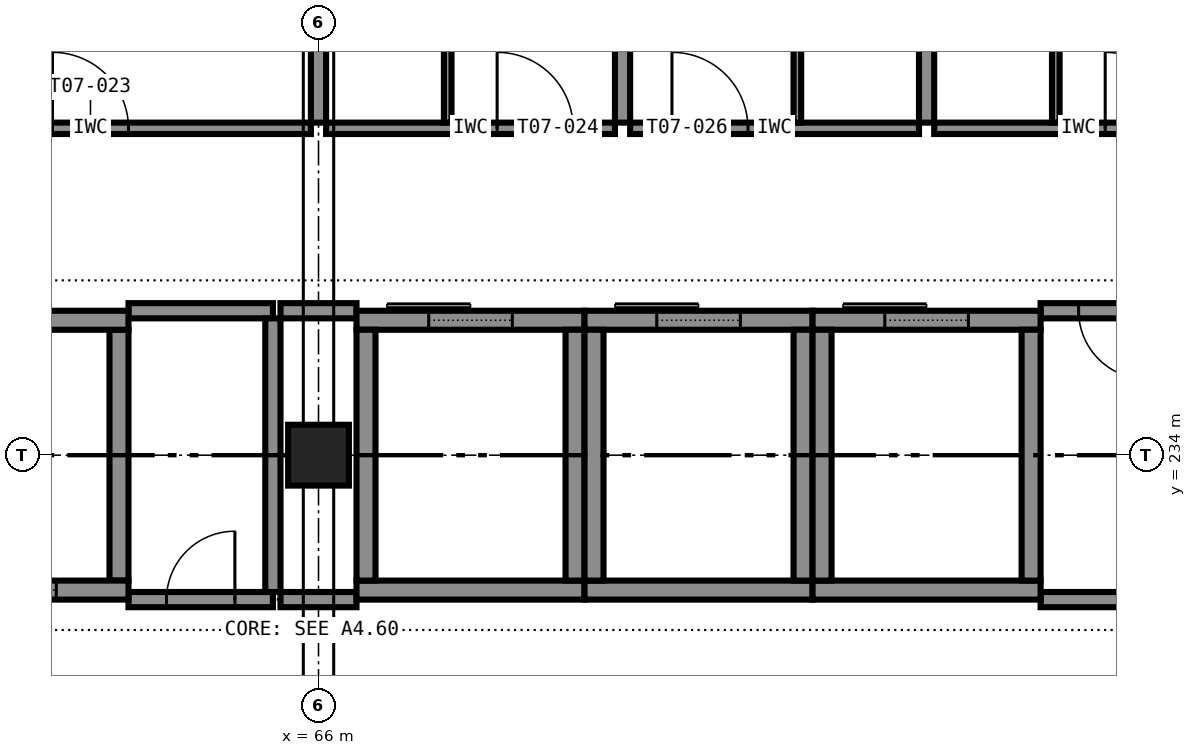
"""IFC4 building model, lengths in metres.
Left out: names, types, materials, properties, quantities, classifications, styles, units other than length and angle.
Written with IfcOpenShell. Run it as: python <this file> out.ifc"""

import sys

from ifc_helpers import new_model, si_unit, direction, frame, frame_2d, origin, origin_2d, place, context, subcontext, project, spatial, rectangle, extrude, element, fill, save


model = new_model("IFC4")
c1 = context("Model", 3, precision=1e-05, world=origin(), true_north=direction((0.0, 1.0)))
c2 = subcontext(c1, "Body", "Model", "MODEL_VIEW")
j1 = project(units=[si_unit("LENGTHUNIT", "METRE"), si_unit("PLANEANGLEUNIT", "RADIAN")], contexts=[c1])
p1 = place(None, origin())
s1 = spatial("IfcSite", under=j1, at=p1, CompositionType="ELEMENT")
p2 = place(p1, origin())
s2 = spatial("IfcBuilding", under=s1, at=p2, CompositionType="ELEMENT")
p3 = place(p2, frame((0.0, 0.0, 39.0)))
s3 = spatial("IfcBuildingStorey", under=s2, at=p3, CompositionType="ELEMENT", Elevation=39.0)
p4 = place(p3, frame((66.0, 234.0, 0.0), z_axis=(0.0, 0.0, 1.0), x_axis=(1.0, 0.0, 0.0)))
e1 = element("IfcColumn", 1, at=p4, inside=s3, PredefinedType="COLUMN", context=c2, shape_type="SweptSolid", body=[
    extrude(rectangle(XDim=0.8, YDim=0.8, at=origin_2d()), origin(), (0.0, 0.0, 1.0), 3.6),
])
p5 = place(p3, frame((60.5, 232.225, 0.0), z_axis=(0.0, 0.0, 1.0), x_axis=(1.0, 0.0, 0.0)))
e2 = element("IfcWall", 2, at=p5, inside=s3, PredefinedType="SHEAR", context=c2, shape_type="SweptSolid", body=[
    extrude(rectangle(XDim=3.0, YDim=0.25, at=frame_2d((1.5, 0.0))), origin(), (0.0, 0.0, 1.0), 3.6),
])
p6 = place(p5, frame((0.95, 0.0, 0.0)))
e3 = element("IfcOpeningElement", 3, at=p6, cuts=e2, PredefinedType="OPENING", context=c2, shape_type="SweptSolid", body=[
    extrude(rectangle(XDim=1.1, YDim=2.1, at=frame_2d((0.55, 1.05))), frame((0.0, 0.135, 0.0), z_axis=(0.0, -1.0, 0.0), x_axis=(1.0, 0.0, 0.0)), (0.0, 0.0, 1.0), 0.27),
])
p7 = place(p3, frame((60.5, 235.775, 0.0), z_axis=(0.0, 0.0, 1.0), x_axis=(1.0, 0.0, 0.0)))
e4 = element("IfcWall", 4, at=p7, inside=s3, PredefinedType="SHEAR", context=c2, shape_type="SweptSolid", body=[
    extrude(rectangle(XDim=3.0, YDim=0.25, at=frame_2d((1.5, 0.0))), origin(), (0.0, 0.0, 1.0), 3.6),
])
p8 = place(p3, frame((63.375, 232.35, 0.0), z_axis=(0.0, 0.0, 1.0), x_axis=(0.0, 1.0, 0.0)))
e5 = element("IfcWall", 5, at=p8, inside=s3, PredefinedType="SHEAR", context=c2, shape_type="SweptSolid", body=[
    extrude(rectangle(XDim=3.3, YDim=0.25, at=frame_2d((1.65, 0.0))), origin(), (0.0, 0.0, 1.0), 3.6),
])
p9 = place(p3, frame((66.5, 232.225, 0.0), z_axis=(0.0, 0.0, 1.0), x_axis=(1.0, 0.0, 0.0)))
e6 = element("IfcWall", 6, at=p9, inside=s3, PredefinedType="SHEAR", context=c2, shape_type="SweptSolid", body=[
    extrude(rectangle(XDim=3.0, YDim=0.25, at=frame_2d((1.5, 0.0))), origin(), (0.0, 0.0, 1.0), 3.6),
])
p10 = place(p3, frame((66.5, 235.775, 0.0), z_axis=(0.0, 0.0, 1.0), x_axis=(1.0, 0.0, 0.0)))
e7 = element("IfcWall", 7, at=p10, inside=s3, PredefinedType="SHEAR", context=c2, shape_type="SweptSolid", body=[
    extrude(rectangle(XDim=3.0, YDim=0.25, at=frame_2d((1.5, 0.0))), origin(), (0.0, 0.0, 1.0), 3.6),
])
p11 = place(p10, frame((0.95, 0.0, 0.0)))
e8 = element("IfcOpeningElement", 8, at=p11, cuts=e7, PredefinedType="OPENING", context=c2, shape_type="SweptSolid", body=[
    extrude(rectangle(XDim=1.1, YDim=2.1, at=frame_2d((0.55, 1.05))), frame((0.0, 0.135, 0.0), z_axis=(0.0, -1.0, 0.0), x_axis=(1.0, 0.0, 0.0)), (0.0, 0.0, 1.0), 0.27),
])
for number, where, z_axis, x_axis in (
    (9, (66.625, 232.35, 0.0), (0.0, 0.0, 1.0), (0.0, 1.0, 0.0)),
    (10, (69.375, 232.35, 0.0), (0.0, 0.0, 1.0), (0.0, 1.0, 0.0)),
):
    element("IfcWall", number, at=place(p3, frame(where, z_axis=z_axis, x_axis=x_axis)), inside=s3, PredefinedType="SHEAR", context=c2, shape_type="SweptSolid", body=[
        extrude(rectangle(XDim=3.3, YDim=0.25, at=frame_2d((1.65, 0.0))), origin(), (0.0, 0.0, 1.0), 3.6),
    ])
p12 = place(p3, frame((69.5, 232.225, 0.0), z_axis=(0.0, 0.0, 1.0), x_axis=(1.0, 0.0, 0.0)))
e11 = element("IfcWall", 11, at=p12, inside=s3, PredefinedType="SHEAR", context=c2, shape_type="SweptSolid", body=[
    extrude(rectangle(XDim=3.0, YDim=0.25, at=frame_2d((1.5, 0.0))), origin(), (0.0, 0.0, 1.0), 3.6),
])
p13 = place(p3, frame((69.5, 235.775, 0.0), z_axis=(0.0, 0.0, 1.0), x_axis=(1.0, 0.0, 0.0)))
e12 = element("IfcWall", 12, at=p13, inside=s3, PredefinedType="SHEAR", context=c2, shape_type="SweptSolid", body=[
    extrude(rectangle(XDim=3.0, YDim=0.25, at=frame_2d((1.5, 0.0))), origin(), (0.0, 0.0, 1.0), 3.6),
])
p14 = place(p13, frame((0.95, 0.0, 0.0)))
e13 = element("IfcOpeningElement", 13, at=p14, cuts=e12, PredefinedType="OPENING", context=c2, shape_type="SweptSolid", body=[
    extrude(rectangle(XDim=1.1, YDim=2.1, at=frame_2d((0.55, 1.05))), frame((0.0, 0.135, 0.0), z_axis=(0.0, -1.0, 0.0), x_axis=(1.0, 0.0, 0.0)), (0.0, 0.0, 1.0), 0.27),
])
for number, where, z_axis, x_axis in (
    (14, (69.625, 232.35, 0.0), (0.0, 0.0, 1.0), (0.0, 1.0, 0.0)),
    (15, (72.375, 232.35, 0.0), (0.0, 0.0, 1.0), (0.0, 1.0, 0.0)),
):
    element("IfcWall", number, at=place(p3, frame(where, z_axis=z_axis, x_axis=x_axis)), inside=s3, PredefinedType="SHEAR", context=c2, shape_type="SweptSolid", body=[
        extrude(rectangle(XDim=3.3, YDim=0.25, at=frame_2d((1.65, 0.0))), origin(), (0.0, 0.0, 1.0), 3.6),
    ])
p15 = place(p3, frame((72.5, 232.225, 0.0), z_axis=(0.0, 0.0, 1.0), x_axis=(1.0, 0.0, 0.0)))
e16 = element("IfcWall", 16, at=p15, inside=s3, PredefinedType="SHEAR", context=c2, shape_type="SweptSolid", body=[
    extrude(rectangle(XDim=3.0, YDim=0.25, at=frame_2d((1.5, 0.0))), origin(), (0.0, 0.0, 1.0), 3.6),
])
p16 = place(p3, frame((72.5, 235.775, 0.0), z_axis=(0.0, 0.0, 1.0), x_axis=(1.0, 0.0, 0.0)))
e17 = element("IfcWall", 17, at=p16, inside=s3, PredefinedType="SHEAR", context=c2, shape_type="SweptSolid", body=[
    extrude(rectangle(XDim=3.0, YDim=0.25, at=frame_2d((1.5, 0.0))), origin(), (0.0, 0.0, 1.0), 3.6),
])
p17 = place(p16, frame((0.95, 0.0, 0.0)))
e18 = element("IfcOpeningElement", 18, at=p17, cuts=e17, PredefinedType="OPENING", context=c2, shape_type="SweptSolid", body=[
    extrude(rectangle(XDim=1.1, YDim=2.1, at=frame_2d((0.55, 1.05))), frame((0.0, 0.135, 0.0), z_axis=(0.0, -1.0, 0.0), x_axis=(1.0, 0.0, 0.0)), (0.0, 0.0, 1.0), 0.27),
])
for number, where, z_axis, x_axis in (
    (19, (72.625, 232.35, 0.0), (0.0, 0.0, 1.0), (0.0, 1.0, 0.0)),
    (20, (75.375, 232.35, 0.0), (0.0, 0.0, 1.0), (0.0, 1.0, 0.0)),
):
    element("IfcWall", number, at=place(p3, frame(where, z_axis=z_axis, x_axis=x_axis)), inside=s3, PredefinedType="SHEAR", context=c2, shape_type="SweptSolid", body=[
        extrude(rectangle(XDim=3.3, YDim=0.25, at=frame_2d((1.65, 0.0))), origin(), (0.0, 0.0, 1.0), 3.6),
    ])
p18 = place(p3, frame((63.5, 232.1, 0.0), z_axis=(0.0, 0.0, 1.0), x_axis=(1.0, 0.0, 0.0)))
e21 = element("IfcWall", 21, at=p18, inside=s3, PredefinedType="PARTITIONING", context=c2, shape_type="SweptSolid", body=[
    extrude(rectangle(XDim=1.9, YDim=0.2, at=frame_2d((0.95, 0.0))), origin(), (0.0, 0.0, 1.0), 3.4),
])
p19 = place(p18, frame((0.5, 0.0, 0.0)))
e22 = element("IfcOpeningElement", 22, at=p19, cuts=e21, PredefinedType="OPENING", context=c2, shape_type="SweptSolid", body=[
    extrude(rectangle(XDim=0.9, YDim=2.1, at=frame_2d((0.45, 1.05))), frame((0.0, 0.11, 0.0), z_axis=(0.0, -1.0, 0.0), x_axis=(1.0, 0.0, 0.0)), (0.0, 0.0, 1.0), 0.22),
])
p20 = place(p3, frame((65.5, 232.1, 0.0), z_axis=(0.0, 0.0, 1.0), x_axis=(1.0, 0.0, 0.0)))
e23 = element("IfcWall", 23, at=p20, inside=s3, PredefinedType="PARTITIONING", context=c2, shape_type="SweptSolid", body=[
    extrude(rectangle(XDim=1.0, YDim=0.2, at=frame_2d((0.5, 0.0))), origin(), (0.0, 0.0, 1.0), 3.4),
])
for number, where, z_axis, x_axis in (
    (24, (75.5, 232.1, 0.0), (0.0, 0.0, 1.0), (1.0, 0.0, 0.0)),
    (25, (63.5, 235.9, 0.0), (0.0, 0.0, 1.0), (1.0, 0.0, 0.0)),
):
    element("IfcWall", number, at=place(p3, frame(where, z_axis=z_axis, x_axis=x_axis)), inside=s3, PredefinedType="PARTITIONING", context=c2, shape_type="SweptSolid", body=[
        extrude(rectangle(XDim=1.9, YDim=0.2, at=frame_2d((0.95, 0.0))), origin(), (0.0, 0.0, 1.0), 3.4),
    ])
p21 = place(p3, frame((65.5, 235.9, 0.0), z_axis=(0.0, 0.0, 1.0), x_axis=(1.0, 0.0, 0.0)))
e26 = element("IfcWall", 26, at=p21, inside=s3, PredefinedType="PARTITIONING", context=c2, shape_type="SweptSolid", body=[
    extrude(rectangle(XDim=1.0, YDim=0.2, at=frame_2d((0.5, 0.0))), origin(), (0.0, 0.0, 1.0), 3.4),
])
p22 = place(p3, frame((77.4, 235.9, 0.0), z_axis=(0.0, 0.0, 1.0), x_axis=(-1.0, 0.0, 0.0)))
e27 = element("IfcWall", 27, at=p22, inside=s3, PredefinedType="PARTITIONING", context=c2, shape_type="SweptSolid", body=[
    extrude(rectangle(XDim=1.9, YDim=0.2, at=frame_2d((0.95, 0.0))), origin(), (0.0, 0.0, 1.0), 3.4),
])
p23 = place(p22, frame((0.5, 0.0, 0.0)))
e28 = element("IfcOpeningElement", 28, at=p23, cuts=e27, PredefinedType="OPENING", context=c2, shape_type="SweptSolid", body=[
    extrude(rectangle(XDim=0.9, YDim=2.1, at=frame_2d((0.45, 1.05))), frame((0.0, 0.11, 0.0), z_axis=(0.0, -1.0, 0.0), x_axis=(1.0, 0.0, 0.0)), (0.0, 0.0, 1.0), 0.22),
])
p24 = place(p3, frame((65.4, 232.2, 0.0), z_axis=(0.0, 0.0, 1.0), x_axis=(0.0, 1.0, 0.0)))
e29 = element("IfcWall", 29, at=p24, inside=s3, PredefinedType="PARTITIONING", context=c2, shape_type="SweptSolid", body=[
    extrude(rectangle(XDim=3.6, YDim=0.2, at=frame_2d((1.8, 0.0))), origin(), (0.0, 0.0, 1.0), 3.4),
])
p25 = place(p3, frame((60.1, 238.3, 0.0), z_axis=(0.0, 0.0, 1.0), x_axis=(1.0, 0.0, 0.0)))
e30 = element("IfcWall", 30, at=p25, inside=s3, PredefinedType="PARTITIONING", context=c2, shape_type="SweptSolid", body=[
    extrude(rectangle(XDim=5.8, YDim=0.15, at=frame_2d((2.9, 0.0))), origin(), (0.0, 0.0, 1.0), 3.4),
])
p26 = place(p25, frame((2.4, 0.0, 0.0)))
e31 = element("IfcOpeningElement", 31, at=p26, cuts=e30, PredefinedType="OPENING", context=c2, shape_type="SweptSolid", body=[
    extrude(rectangle(XDim=1.0, YDim=2.1, at=frame_2d((0.5, 1.05))), frame((0.0, 0.085, 0.0), z_axis=(0.0, -1.0, 0.0), x_axis=(1.0, 0.0, 0.0)), (0.0, 0.0, 1.0), 0.17),
])
p27 = place(p3, frame((66.1, 238.3, 0.0), z_axis=(0.0, 0.0, 1.0), x_axis=(1.0, 0.0, 0.0)))
e32 = element("IfcWall", 32, at=p27, inside=s3, PredefinedType="PARTITIONING", context=c2, shape_type="SweptSolid", body=[
    extrude(rectangle(XDim=3.8, YDim=0.15, at=frame_2d((1.9, 0.0))), origin(), (0.0, 0.0, 1.0), 3.4),
])
p28 = place(p27, frame((2.25, 0.0, 0.0)))
e33 = element("IfcOpeningElement", 33, at=p28, cuts=e32, PredefinedType="OPENING", context=c2, shape_type="SweptSolid", body=[
    extrude(rectangle(XDim=1.0, YDim=2.1, at=frame_2d((0.5, 1.05))), frame((0.0, 0.085, 0.0), z_axis=(0.0, -1.0, 0.0), x_axis=(1.0, 0.0, 0.0)), (0.0, 0.0, 1.0), 0.17),
])
p29 = place(p3, frame((67.7, 241.25, 0.0), z_axis=(0.0, 0.0, 1.0), x_axis=(0.0, -1.0, 0.0)))
e34 = element("IfcWall", 34, at=p29, inside=s3, PredefinedType="PARTITIONING", context=c2, shape_type="SweptSolid", body=[
    extrude(rectangle(XDim=2.875, YDim=0.1, at=frame_2d((1.438, 0.0))), origin(), (0.0, 0.0, 1.0), 3.4),
])
p30 = place(p29, frame((1.038, 0.0, 0.0)))
e35 = element("IfcOpeningElement", 35, at=p30, cuts=e34, PredefinedType="OPENING", context=c2, shape_type="SweptSolid", body=[
    extrude(rectangle(XDim=0.8, YDim=2.1, at=frame_2d((0.4, 1.05))), frame((0.0, 0.06, 0.0), z_axis=(0.0, -1.0, 0.0), x_axis=(1.0, 0.0, 0.0)), (0.0, 0.0, 1.0), 0.12),
])
p31 = place(p3, frame((70.1, 238.3, 0.0), z_axis=(0.0, 0.0, 1.0), x_axis=(1.0, 0.0, 0.0)))
e36 = element("IfcWall", 36, at=p31, inside=s3, PredefinedType="PARTITIONING", context=c2, shape_type="SweptSolid", body=[
    extrude(rectangle(XDim=3.8, YDim=0.15, at=frame_2d((1.9, 0.0))), origin(), (0.0, 0.0, 1.0), 3.4),
])
p32 = place(p31, frame((0.55, 0.0, 0.0)))
e37 = element("IfcOpeningElement", 37, at=p32, cuts=e36, PredefinedType="OPENING", context=c2, shape_type="SweptSolid", body=[
    extrude(rectangle(XDim=1.0, YDim=2.1, at=frame_2d((0.5, 1.05))), frame((0.0, 0.085, 0.0), z_axis=(0.0, -1.0, 0.0), x_axis=(1.0, 0.0, 0.0)), (0.0, 0.0, 1.0), 0.17),
])
p33 = place(p3, frame((72.3, 238.375, 0.0), z_axis=(0.0, 0.0, 1.0), x_axis=(0.0, 1.0, 0.0)))
e38 = element("IfcWall", 38, at=p33, inside=s3, PredefinedType="PARTITIONING", context=c2, shape_type="SweptSolid", body=[
    extrude(rectangle(XDim=2.875, YDim=0.1, at=frame_2d((1.438, 0.0))), origin(), (0.0, 0.0, 1.0), 3.4),
])
p34 = place(p33, frame((1.038, 0.0, 0.0)))
e39 = element("IfcOpeningElement", 39, at=p34, cuts=e38, PredefinedType="OPENING", context=c2, shape_type="SweptSolid", body=[
    extrude(rectangle(XDim=0.8, YDim=2.1, at=frame_2d((0.4, 1.05))), frame((0.0, 0.06, 0.0), z_axis=(0.0, -1.0, 0.0), x_axis=(1.0, 0.0, 0.0)), (0.0, 0.0, 1.0), 0.12),
])
p35 = place(p3, frame((74.1, 238.3, 0.0), z_axis=(0.0, 0.0, 1.0), x_axis=(1.0, 0.0, 0.0)))
e40 = element("IfcWall", 40, at=p35, inside=s3, PredefinedType="PARTITIONING", context=c2, shape_type="SweptSolid", body=[
    extrude(rectangle(XDim=3.8, YDim=0.15, at=frame_2d((1.9, 0.0))), origin(), (0.0, 0.0, 1.0), 3.4),
])
p36 = place(p35, frame((2.25, 0.0, 0.0)))
e41 = element("IfcOpeningElement", 41, at=p36, cuts=e40, PredefinedType="OPENING", context=c2, shape_type="SweptSolid", body=[
    extrude(rectangle(XDim=1.0, YDim=2.1, at=frame_2d((0.5, 1.05))), frame((0.0, 0.085, 0.0), z_axis=(0.0, -1.0, 0.0), x_axis=(1.0, 0.0, 0.0)), (0.0, 0.0, 1.0), 0.17),
])
p37 = place(p3, frame((75.7, 241.25, 0.0), z_axis=(0.0, 0.0, 1.0), x_axis=(0.0, -1.0, 0.0)))
e42 = element("IfcWall", 42, at=p37, inside=s3, PredefinedType="PARTITIONING", context=c2, shape_type="SweptSolid", body=[
    extrude(rectangle(XDim=2.875, YDim=0.1, at=frame_2d((1.438, 0.0))), origin(), (0.0, 0.0, 1.0), 3.4),
])
p38 = place(p37, frame((1.038, 0.0, 0.0)))
e43 = element("IfcOpeningElement", 43, at=p38, cuts=e42, PredefinedType="OPENING", context=c2, shape_type="SweptSolid", body=[
    extrude(rectangle(XDim=0.8, YDim=2.1, at=frame_2d((0.4, 1.05))), frame((0.0, 0.06, 0.0), z_axis=(0.0, -1.0, 0.0), x_axis=(1.0, 0.0, 0.0)), (0.0, 0.0, 1.0), 0.12),
])
p39 = place(p3, frame((66.0, 245.6, 0.0), z_axis=(0.0, 0.0, 1.0), x_axis=(0.0, -1.0, 0.0)))
e44 = element("IfcWall", 44, at=p39, inside=s3, PredefinedType="PARTITIONING", context=c2, shape_type="SweptSolid", body=[
    extrude(rectangle(XDim=7.225, YDim=0.2, at=frame_2d((3.613, 0.0))), origin(), (0.0, 0.0, 1.0), 2.6),
])
for number, where, z_axis, x_axis in (
    (45, (70.0, 245.7, 0.0), (0.0, 0.0, 1.0), (0.0, -1.0, 0.0)),
    (46, (74.0, 245.7, 0.0), (0.0, 0.0, 1.0), (0.0, -1.0, 0.0)),
):
    element("IfcWall", number, at=place(p3, frame(where, z_axis=z_axis, x_axis=x_axis)), inside=s3, PredefinedType="PARTITIONING", context=c2, shape_type="SweptSolid", body=[
        extrude(rectangle(XDim=7.325, YDim=0.2, at=frame_2d((3.663, 0.0))), origin(), (0.0, 0.0, 1.0), 3.4),
    ])
p40 = place(p19, origin())
e47 = element("IfcDoor", 47, at=p40, inside=s3, OperationType="SINGLE_SWING_RIGHT", PredefinedType="DOOR", context=c2, shape_type="SweptSolid", body=[
    extrude(rectangle(XDim=0.9, YDim=2.1, at=frame_2d((0.45, 1.05))), frame((0.0, 0.025, 0.0), z_axis=(0.0, -1.0, 0.0), x_axis=(1.0, 0.0, 0.0)), (0.0, 0.0, 1.0), 0.05),
])
fill(e22, e47)
p41 = place(p23, origin())
e48 = element("IfcDoor", 48, at=p41, inside=s3, OperationType="SINGLE_SWING_LEFT", PredefinedType="DOOR", context=c2, shape_type="SweptSolid", body=[
    extrude(rectangle(XDim=0.9, YDim=2.1, at=frame_2d((0.45, 1.05))), frame((0.0, 0.025, 0.0), z_axis=(0.0, -1.0, 0.0), x_axis=(1.0, 0.0, 0.0)), (0.0, 0.0, 1.0), 0.05),
])
fill(e28, e48)
p42 = place(p26, origin())
e49 = element("IfcDoor", 49, at=p42, inside=s3, OperationType="SINGLE_SWING_LEFT", PredefinedType="DOOR", context=c2, shape_type="SweptSolid", body=[
    extrude(rectangle(XDim=1.0, YDim=2.1, at=frame_2d((0.5, 1.05))), frame((0.0, 0.025, 0.0), z_axis=(0.0, -1.0, 0.0), x_axis=(1.0, 0.0, 0.0)), (0.0, 0.0, 1.0), 0.05),
])
fill(e31, e49)
p43 = place(p28, origin())
e50 = element("IfcDoor", 50, at=p43, inside=s3, OperationType="SINGLE_SWING_LEFT", PredefinedType="DOOR", context=c2, shape_type="SweptSolid", body=[
    extrude(rectangle(XDim=1.0, YDim=2.1, at=frame_2d((0.5, 1.05))), frame((0.0, 0.025, 0.0), z_axis=(0.0, -1.0, 0.0), x_axis=(1.0, 0.0, 0.0)), (0.0, 0.0, 1.0), 0.05),
])
fill(e33, e50)
p44 = place(p32, origin())
e51 = element("IfcDoor", 51, at=p44, inside=s3, OperationType="SINGLE_SWING_LEFT", PredefinedType="DOOR", context=c2, shape_type="SweptSolid", body=[
    extrude(rectangle(XDim=1.0, YDim=2.1, at=frame_2d((0.5, 1.05))), frame((0.0, 0.025, 0.0), z_axis=(0.0, -1.0, 0.0), x_axis=(1.0, 0.0, 0.0)), (0.0, 0.0, 1.0), 0.05),
])
fill(e37, e51)
p45 = place(p36, origin())
e52 = element("IfcDoor", 52, at=p45, inside=s3, OperationType="SINGLE_SWING_LEFT", PredefinedType="DOOR", context=c2, shape_type="SweptSolid", body=[
    extrude(rectangle(XDim=1.0, YDim=2.1, at=frame_2d((0.5, 1.05))), frame((0.0, 0.025, 0.0), z_axis=(0.0, -1.0, 0.0), x_axis=(1.0, 0.0, 0.0)), (0.0, 0.0, 1.0), 0.05),
])
fill(e41, e52)
p46 = place(p6, origin())
e53 = element("IfcDoor", 53, at=p46, inside=s3, OperationType="SLIDING_TO_LEFT", PredefinedType="DOOR", context=c2, shape_type="SweptSolid", body=[
    extrude(rectangle(XDim=1.1, YDim=2.1, at=frame_2d((0.55, 1.05))), frame((0.0, 0.025, 0.0), z_axis=(0.0, -1.0, 0.0), x_axis=(1.0, 0.0, 0.0)), (0.0, 0.0, 1.0), 0.05),
])
fill(e3, e53)
p47 = place(p11, origin())
e54 = element("IfcDoor", 54, at=p47, inside=s3, OperationType="SLIDING_TO_LEFT", PredefinedType="DOOR", context=c2, shape_type="SweptSolid", body=[
    extrude(rectangle(XDim=1.1, YDim=2.1, at=frame_2d((0.55, 1.05))), frame((0.0, 0.025, 0.0), z_axis=(0.0, -1.0, 0.0), x_axis=(1.0, 0.0, 0.0)), (0.0, 0.0, 1.0), 0.05),
])
fill(e8, e54)
p48 = place(p14, origin())
e55 = element("IfcDoor", 55, at=p48, inside=s3, OperationType="SLIDING_TO_LEFT", PredefinedType="DOOR", context=c2, shape_type="SweptSolid", body=[
    extrude(rectangle(XDim=1.1, YDim=2.1, at=frame_2d((0.55, 1.05))), frame((0.0, 0.025, 0.0), z_axis=(0.0, -1.0, 0.0), x_axis=(1.0, 0.0, 0.0)), (0.0, 0.0, 1.0), 0.05),
])
fill(e13, e55)
p49 = place(p17, origin())
e56 = element("IfcDoor", 56, at=p49, inside=s3, OperationType="SLIDING_TO_LEFT", PredefinedType="DOOR", context=c2, shape_type="SweptSolid", body=[
    extrude(rectangle(XDim=1.1, YDim=2.1, at=frame_2d((0.55, 1.05))), frame((0.0, 0.025, 0.0), z_axis=(0.0, -1.0, 0.0), x_axis=(1.0, 0.0, 0.0)), (0.0, 0.0, 1.0), 0.05),
])
fill(e18, e56)
save(model, sys.argv[1])
